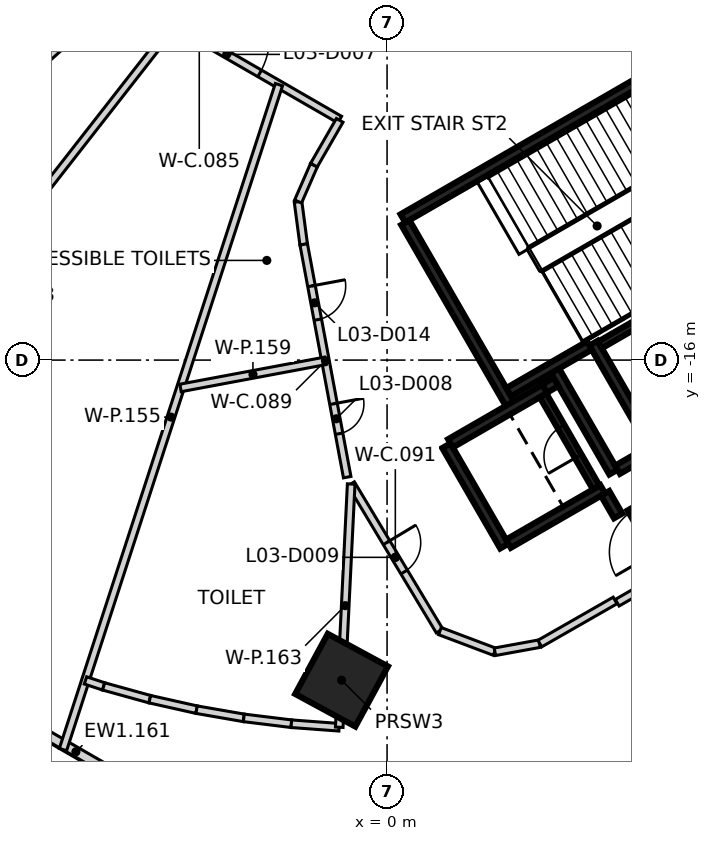
"""IFC4 building model, lengths in metres.
Left out: names, types, materials, properties, quantities, classifications, styles, units other than length and angle.
Written with IfcOpenShell. Run it as: python <this file> out.ifc"""

import sys

from ifc_helpers import new_model, si_unit, direction, frame, frame_2d, origin, origin_2d, place, context, subcontext, project, spatial, rectangle, extrude, element, fill, save


model = new_model("IFC4")
c1 = context("Model", 3, precision=1e-05, world=origin(), true_north=direction((0.0, 1.0)))
c2 = subcontext(c1, "Body", "Model", "MODEL_VIEW")
j1 = project(units=[si_unit("LENGTHUNIT", "METRE"), si_unit("PLANEANGLEUNIT", "RADIAN")], contexts=[c1])
p1 = place(None, origin())
s1 = spatial("IfcSite", under=j1, at=p1, CompositionType="ELEMENT")
p2 = place(p1, origin())
s2 = spatial("IfcBuilding", under=s1, at=p2, CompositionType="ELEMENT")
p3 = place(p2, frame((0.0, 0.0, 19.5)))
s3 = spatial("IfcBuildingStorey", under=s2, at=p3, CompositionType="ELEMENT", Elevation=19.5)
p4 = place(p3, frame((-1.197, -24.423, -0.35), z_axis=(0.0, 0.0, 1.0), x_axis=(0.476198301069, 0.879337920289, 0.0)))
e1 = element("IfcColumn", 1, at=p4, inside=s3, PredefinedType="COLUMN", context=c2, shape_type="SweptSolid", body=[
    extrude(rectangle(XDim=1.8, YDim=1.8, at=origin_2d()), origin(), (0.0, 0.0, 1.0), 2.5),
])
p5 = place(p3, frame((-6.21, -27.447, 0.0), z_axis=(0.0, 0.0, 1.0), x_axis=(-0.866046694585, 0.499963121439, 0.0)))
e2 = element("IfcWall", 2, at=p5, inside=s3, PredefinedType="SOLIDWALL", context=c2, shape_type="SweptSolid", body=[
    extrude(rectangle(XDim=4.566, YDim=0.25, at=frame_2d((2.283, 0.0))), origin(), (0.0, 0.0, 1.0), 4.55),
])
p6 = place(p3, frame((0.417, -12.273, 0.0), z_axis=(0.0, 0.0, 1.0), x_axis=(0.866021906294, 0.500006057782, 0.0)))
e3 = element("IfcWall", 3, at=p6, inside=s3, PredefinedType="SHEAR", context=c2, shape_type="SweptSolid", body=[
    extrude(rectangle(XDim=11.55, YDim=0.25, at=frame_2d((5.775, 0.0))), origin(), (0.0, 0.0, 1.0), 4.55),
])
p7 = place(p6, frame((10.025, 0.0, 0.0)))
e4 = element("IfcOpeningElement", 4, at=p7, cuts=e3, PredefinedType="OPENING", context=c2, shape_type="SweptSolid", body=[
    extrude(rectangle(XDim=1.2, YDim=2.1, at=frame_2d((0.6, 1.05))), frame((0.0, 0.135, 0.0), z_axis=(0.0, -1.0, 0.0), x_axis=(1.0, 0.0, 0.0)), (0.0, 0.0, 1.0), 0.27),
])
p8 = place(p6, frame((8.725, 0.0, 0.0)))
e5 = element("IfcOpeningElement", 5, at=p8, cuts=e3, PredefinedType="OPENING", context=c2, shape_type="SweptSolid", body=[
    extrude(rectangle(XDim=1.2, YDim=2.1, at=frame_2d((0.6, 1.05))), frame((0.0, 0.135, 0.0), z_axis=(0.0, -1.0, 0.0), x_axis=(1.0, 0.0, 0.0)), (0.0, 0.0, 1.0), 0.27),
])
p9 = place(p3, frame((3.235, -17.153, 0.0), z_axis=(0.0, 0.0, 1.0), x_axis=(-0.500008851346, 0.866020293397, 0.0)))
e6 = element("IfcWall", 6, at=p9, inside=s3, PredefinedType="SHEAR", context=c2, shape_type="SweptSolid", body=[
    extrude(rectangle(XDim=5.51, YDim=0.25, at=frame_2d((2.755, 0.0))), origin(), (0.0, 0.0, 1.0), 4.55),
])
p10 = place(p3, frame((7.031, -18.327, 0.0), z_axis=(0.0, 0.0, 1.0), x_axis=(-0.499971222258, 0.866042017984, 0.0)))
e7 = element("IfcWall", 7, at=p10, inside=s3, PredefinedType="SHEAR", context=c2, shape_type="SweptSolid", body=[
    extrude(rectangle(XDim=3.2, YDim=0.25, at=frame_2d((1.6, 0.0))), origin(), (0.0, 0.0, 1.0), 4.55),
])
p11 = place(p3, frame((3.085, -20.894, 0.0), z_axis=(0.0, 0.0, 1.0), x_axis=(-0.499978833458, 0.866037623948, 0.0)))
e8 = element("IfcWall", 8, at=p11, inside=s3, PredefinedType="SHEAR", context=c2, shape_type="SweptSolid", body=[
    extrude(rectangle(XDim=3.05, YDim=0.25, at=frame_2d((1.525, 0.0))), origin(), (0.0, 0.0, 1.0), 4.55),
])
p12 = place(p3, frame((1.669, -18.19, 0.0), z_axis=(0.0, 0.0, 1.0), x_axis=(0.866042235819, 0.499970844928, 0.0)))
e9 = element("IfcWall", 9, at=p12, inside=s3, PredefinedType="SHEAR", context=c2, shape_type="SweptSolid", body=[
    extrude(rectangle(XDim=2.865, YDim=0.25, at=frame_2d((1.432, 0.0))), origin(), (0.0, 0.0, 1.0), 4.55),
])
p13 = place(p3, frame((5.675, -19.399, 0.0), z_axis=(0.0, 0.0, 1.0), x_axis=(-0.866026637627, -0.499997862916, 0.0)))
e10 = element("IfcWall", 10, at=p13, inside=s3, PredefinedType="SHEAR", context=c2, shape_type="SweptSolid", body=[
    extrude(rectangle(XDim=2.865, YDim=0.25, at=frame_2d((1.432, 0.0))), origin(), (0.0, 0.0, 1.0), 4.55),
])
p14 = place(p3, frame((4.414, -16.276, 0.0), z_axis=(0.0, 0.0, 1.0), x_axis=(0.500003324108, -0.866023484601, 0.0)))
e11 = element("IfcWall", 11, at=p14, inside=s3, PredefinedType="SHEAR", context=c2, shape_type="SweptSolid", body=[
    extrude(rectangle(XDim=3.085, YDim=0.25, at=frame_2d((1.542, 0.0))), origin(), (0.0, 0.0, 1.0), 4.55),
])
p15 = place(p3, frame((5.322, -15.619, 0.0), z_axis=(0.0, 0.0, 1.0), x_axis=(-0.866026229868, -0.499998569178, 0.0)))
e12 = element("IfcWall", 12, at=p15, inside=s3, PredefinedType="SHEAR", context=c2, shape_type="SweptSolid", body=[
    extrude(rectangle(XDim=2.449, YDim=0.25, at=frame_2d((1.225, 0.0))), origin(), (0.0, 0.0, 1.0), 4.55),
])
p16 = place(p3, frame((7.367, -21.51, 0.0), z_axis=(0.0, 0.0, 1.0), x_axis=(-0.499983108224, 0.866035156036, 0.0)))
e13 = element("IfcWall", 13, at=p16, inside=s3, PredefinedType="SHEAR", context=c2, shape_type="SweptSolid", body=[
    extrude(rectangle(XDim=1.865, YDim=0.25, at=frame_2d((0.932, 0.0))), origin(), (0.0, 0.0, 1.0), 4.55),
])
p17 = place(p16, frame((0.535, 0.0, 0.0)))
e14 = element("IfcOpeningElement", 14, at=p17, cuts=e13, PredefinedType="OPENING", context=c2, shape_type="SweptSolid", body=[
    extrude(rectangle(XDim=1.25, YDim=2.1, at=frame_2d((0.625, 1.05))), frame((0.0, 0.135, 0.0), z_axis=(0.0, -1.0, 0.0), x_axis=(1.0, 0.0, 0.0)), (0.0, 0.0, 1.0), 0.27),
])
p18 = place(p3, frame((6.065, -18.885, 0.0), z_axis=(0.0, 0.0, 1.0), x_axis=(0.866017078145, 0.500014420154, 0.0)))
e15 = element("IfcWall", 15, at=p18, inside=s3, PredefinedType="SHEAR", context=c2, shape_type="SweptSolid", body=[
    extrude(rectangle(XDim=0.989, YDim=0.25, at=frame_2d((0.495, 0.0))), origin(), (0.0, 0.0, 1.0), 4.55),
])
p19 = place(p3, frame((6.08, -20.1, 0.0), z_axis=(0.0, 0.0, 1.0), x_axis=(-0.500051773299, 0.865995510393, 0.0)))
e16 = element("IfcWall", 16, at=p19, inside=s3, PredefinedType="SHEAR", context=c2, shape_type="SweptSolid", body=[
    extrude(rectangle(XDim=0.685, YDim=0.25, at=frame_2d((0.342, 0.0))), origin(), (0.0, 0.0, 1.0), 4.55),
])
p20 = place(p3, frame((4.145, -16.749, 0.0), z_axis=(0.0, 0.0, 1.0), x_axis=(0.866185586049, 0.49972245349, 0.0)))
e17 = element("IfcWall", 17, at=p20, inside=s3, PredefinedType="SHEAR", context=c2, shape_type="SweptSolid", body=[
    extrude(rectangle(XDim=0.344, YDim=0.25, at=frame_2d((0.172, 0.0))), origin(), (0.0, 0.0, 1.0), 4.55),
])
p21 = place(p3, frame((10.538, -12.752, 0.0), z_axis=(0.0, 0.0, 1.0), x_axis=(-0.866038630372, -0.499977090179, 0.0)))
e18 = element("IfcWall", 18, at=p21, inside=s3, PredefinedType="SHEAR", context=c2, shape_type="SweptSolid", body=[
    extrude(rectangle(XDim=5.699, YDim=0.2, at=frame_2d((2.85, 0.0))), origin(), (0.0, 0.0, 1.0), 4.55),
])
p22 = place(p3, frame((5.503, -19.352, 0.0), z_axis=(0.0, 0.0, 1.0), x_axis=(-0.499986818241, 0.866033014143, 0.0)))
e19 = element("IfcWall", 19, at=p22, inside=s3, PredefinedType="SHEAR", context=c2, shape_type="SweptSolid", body=[
    extrude(rectangle(XDim=2.798, YDim=0.2, at=frame_2d((1.399, 0.0))), origin(), (0.0, 0.0, 1.0), 4.55),
])
p23 = place(p22, frame((0.949, 0.0, 0.0)))
e20 = element("IfcOpeningElement", 20, at=p23, cuts=e19, PredefinedType="OPENING", context=c2, shape_type="SweptSolid", body=[
    extrude(rectangle(XDim=0.9, YDim=2.1, at=frame_2d((0.45, 1.05))), frame((0.0, 0.11, 0.0), z_axis=(0.0, -1.0, 0.0), x_axis=(1.0, 0.0, 0.0)), (0.0, 0.0, 1.0), 0.22),
])
p24 = place(p3, frame((-8.636, -5.407, 0.0), z_axis=(0.0, 0.0, 1.0), x_axis=(0.86608314541, -0.499899975231, 0.0)))
e21 = element("IfcWall", 21, at=p24, inside=s3, PredefinedType="PARTITIONING", context=c2, shape_type="SweptSolid", body=[
    extrude(rectangle(XDim=8.532, YDim=0.2, at=frame_2d((4.266, 0.0))), origin(), (0.0, 0.0, 1.0), 4.55),
])
p25 = place(p24, frame((2.231, 0.0, 0.0)))
e22 = element("IfcOpeningElement", 22, at=p25, cuts=e21, PredefinedType="OPENING", context=c2, shape_type="SweptSolid", body=[
    extrude(rectangle(XDim=0.9, YDim=2.1, at=frame_2d((0.45, 1.05))), frame((0.0, 0.11, 0.0), z_axis=(0.0, -1.0, 0.0), x_axis=(1.0, 0.0, 0.0)), (0.0, 0.0, 1.0), 0.22),
])
p26 = place(p24, frame((4.101, 0.0, 0.0)))
e23 = element("IfcOpeningElement", 23, at=p26, cuts=e21, PredefinedType="OPENING", context=c2, shape_type="SweptSolid", body=[
    extrude(rectangle(XDim=2.0, YDim=2.1, at=frame_2d((1.0, 1.05))), frame((0.0, 0.11, 0.0), z_axis=(0.0, -1.0, 0.0), x_axis=(1.0, 0.0, 0.0)), (0.0, 0.0, 1.0), 0.22),
])
p27 = place(p3, frame((-2.342, -11.835, 0.0), z_axis=(0.0, 0.0, 1.0), x_axis=(0.130834272089, -0.991404253192, 0.0)))
e24 = element("IfcWall", 24, at=p27, inside=s3, PredefinedType="PARTITIONING", context=c2, shape_type="SweptSolid", body=[
    extrude(rectangle(XDim=1.131, YDim=0.2, at=frame_2d((0.565, 0.0))), origin(), (0.0, 0.0, 1.0), 4.55),
])
p28 = place(p3, frame((-2.341, -11.827, 0.0), z_axis=(0.0, 0.0, 1.0), x_axis=(0.400116595296, 0.916464243803, 0.0)))
e25 = element("IfcWall", 25, at=p28, inside=s3, PredefinedType="PARTITIONING", context=c2, shape_type="SweptSolid", body=[
    extrude(rectangle(XDim=1.04, YDim=0.2, at=frame_2d((0.52, 0.0))), origin(), (0.0, 0.0, 1.0), 4.55),
])
p29 = place(p3, frame((-2.193, -12.956, 0.0), z_axis=(0.0, 0.0, 1.0), x_axis=(0.183666249042, -0.982988661665, 0.0)))
e26 = element("IfcWall", 26, at=p29, inside=s3, PredefinedType="PARTITIONING", context=c2, shape_type="SweptSolid", body=[
    extrude(rectangle(XDim=6.23, YDim=0.2, at=frame_2d((3.115, 0.0))), origin(), (0.0, 0.0, 1.0), 4.55),
])
p30 = place(p29, frame((4.268, 0.0, 0.0)))
e27 = element("IfcOpeningElement", 27, at=p30, cuts=e26, PredefinedType="OPENING", context=c2, shape_type="SweptSolid", body=[
    extrude(rectangle(XDim=0.8, YDim=2.1, at=frame_2d((0.4, 1.05))), frame((0.0, 0.11, 0.0), z_axis=(0.0, -1.0, 0.0), x_axis=(1.0, 0.0, 0.0)), (0.0, 0.0, 1.0), 0.22),
])
p31 = place(p29, frame((1.114, 0.0, 0.0)))
e28 = element("IfcOpeningElement", 28, at=p31, cuts=e26, PredefinedType="OPENING", context=c2, shape_type="SweptSolid", body=[
    extrude(rectangle(XDim=0.9, YDim=2.1, at=frame_2d((0.45, 1.05))), frame((0.0, 0.11, 0.0), z_axis=(0.0, -1.0, 0.0), x_axis=(1.0, 0.0, 0.0)), (0.0, 0.0, 1.0), 0.22),
])
p32 = place(p3, frame((-1.924, -10.869, 0.0), z_axis=(0.0, 0.0, 1.0), x_axis=(0.499136241111, 0.866523521209, 0.0)))
e29 = element("IfcWall", 29, at=p32, inside=s3, PredefinedType="PARTITIONING", context=c2, shape_type="SweptSolid", body=[
    extrude(rectangle(XDim=1.358, YDim=0.2, at=frame_2d((0.679, 0.0))), origin(), (0.0, 0.0, 1.0), 4.55),
])
p33 = place(p3, frame((-0.946, -19.254, 0.0), z_axis=(0.0, 0.0, 1.0), x_axis=(0.515131406019, -0.857111214798, 0.0)))
e30 = element("IfcWall", 30, at=p33, inside=s3, PredefinedType="PARTITIONING", context=c2, shape_type="SweptSolid", body=[
    extrude(rectangle(XDim=4.518, YDim=0.2, at=frame_2d((2.259, 0.0))), origin(), (0.0, 0.0, 1.0), 4.55),
])
p34 = place(p33, frame((1.809, 0.0, 0.0)))
e31 = element("IfcOpeningElement", 31, at=p34, cuts=e30, PredefinedType="OPENING", context=c2, shape_type="SweptSolid", body=[
    extrude(rectangle(XDim=0.9, YDim=2.1, at=frame_2d((0.45, 1.05))), frame((0.0, 0.11, 0.0), z_axis=(0.0, -1.0, 0.0), x_axis=(1.0, 0.0, 0.0)), (0.0, 0.0, 1.0), 0.22),
])
p35 = place(p3, frame((1.39, -23.131, 0.0), z_axis=(0.0, 0.0, 1.0), x_axis=(0.935656991295, -0.352910745997, 0.0)))
e32 = element("IfcWall", 32, at=p35, inside=s3, PredefinedType="PARTITIONING", context=c2, shape_type="SweptSolid", body=[
    extrude(rectangle(XDim=1.541, YDim=0.2, at=frame_2d((0.771, 0.0))), origin(), (0.0, 0.0, 1.0), 4.55),
])
p36 = place(p3, frame((2.837, -23.675, 0.0), z_axis=(0.0, 0.0, 1.0), x_axis=(0.983774851332, 0.179407474447, 0.0)))
e33 = element("IfcWall", 33, at=p36, inside=s3, PredefinedType="PARTITIONING", context=c2, shape_type="SweptSolid", body=[
    extrude(rectangle(XDim=1.193, YDim=0.2, at=frame_2d((0.597, 0.0))), origin(), (0.0, 0.0, 1.0), 4.55),
])
p37 = place(p3, frame((4.019, -23.459, 0.0), z_axis=(0.0, 0.0, 1.0), x_axis=(0.86785453754, 0.496818378959, 0.0)))
e34 = element("IfcWall", 34, at=p37, inside=s3, PredefinedType="PARTITIONING", context=c2, shape_type="SweptSolid", body=[
    extrude(rectangle(XDim=2.282, YDim=0.2, at=frame_2d((1.141, 0.0))), origin(), (0.0, 0.0, 1.0), 4.55),
])
p38 = place(p3, frame((6.056, -22.384, 0.0), z_axis=(0.0, 0.0, 1.0), x_axis=(0.866396419095, 0.499356831314, 0.0)))
e35 = element("IfcWall", 35, at=p38, inside=s3, PredefinedType="PARTITIONING", context=c2, shape_type="SweptSolid", body=[
    extrude(rectangle(XDim=1.387, YDim=0.2, at=frame_2d((0.694, 0.0))), origin(), (0.0, 0.0, 1.0), 4.55),
])
p39 = place(p3, frame((-21.094, -18.993, 0.0), z_axis=(0.0, 0.0, 1.0), x_axis=(0.743122161884, 0.669155775972, 0.0)))
e36 = element("IfcWall", 36, at=p39, inside=s3, PredefinedType="PARTITIONING", context=c2, shape_type="SweptSolid", body=[
    extrude(rectangle(XDim=18.92, YDim=0.2, at=frame_2d((9.46, 0.0))), origin(), (0.0, 0.0, 1.0), 2.15),
])
p40 = place(p3, frame((-16.783, -21.481, 0.0), z_axis=(0.0, 0.0, 1.0), x_axis=(0.615637784037, 0.788029262696, 0.0)))
e37 = element("IfcWall", 37, at=p40, inside=s3, PredefinedType="PARTITIONING", context=c2, shape_type="SweptSolid", body=[
    extrude(rectangle(XDim=18.17, YDim=0.2, at=frame_2d((9.085, 0.0))), origin(), (0.0, 0.0, 1.0), 2.15),
])
p41 = place(p3, frame((-8.528, -26.248, 0.0), z_axis=(0.0, 0.0, 1.0), x_axis=(0.308912004648, 0.951090623119, 0.0)))
e38 = element("IfcWall", 38, at=p41, inside=s3, PredefinedType="PARTITIONING", context=c2, shape_type="SweptSolid", body=[
    extrude(rectangle(XDim=18.395, YDim=0.2, at=frame_2d((9.197, 0.0))), origin(), (0.0, 0.0, 1.0), 2.15),
])
p42 = place(p3, frame((-7.935, -24.428, 0.0), z_axis=(0.0, 0.0, 1.0), x_axis=(0.949312985708, -0.314332395984, 0.0)))
e39 = element("IfcWall", 39, at=p42, inside=s3, PredefinedType="PARTITIONING", context=c2, shape_type="SweptSolid", body=[
    extrude(rectangle(XDim=0.502, YDim=0.2, at=frame_2d((0.251, 0.0))), origin(), (0.0, 0.0, 1.0), 4.55),
])
p43 = place(p3, frame((-7.458, -24.586, 0.0), z_axis=(0.0, 0.0, 1.0), x_axis=(0.96379206232, -0.266654946718, 0.0)))
e40 = element("IfcWall", 40, at=p43, inside=s3, PredefinedType="PARTITIONING", context=c2, shape_type="SweptSolid", body=[
    extrude(rectangle(XDim=1.261, YDim=0.2, at=frame_2d((0.63, 0.0))), origin(), (0.0, 0.0, 1.0), 4.55),
])
p44 = place(p3, frame((-6.243, -24.922, 0.0), z_axis=(0.0, 0.0, 1.0), x_axis=(0.975793849567, -0.218692393893, 0.0)))
e41 = element("IfcWall", 41, at=p44, inside=s3, PredefinedType="PARTITIONING", context=c2, shape_type="SweptSolid", body=[
    extrude(rectangle(XDim=1.261, YDim=0.2, at=frame_2d((0.631, 0.0))), origin(), (0.0, 0.0, 1.0), 4.55),
])
p45 = place(p3, frame((-5.435, -16.733, 0.0), z_axis=(0.0, 0.0, 1.0), x_axis=(0.982959024913, 0.183824795232, 0.0)))
e42 = element("IfcWall", 42, at=p45, inside=s3, PredefinedType="PARTITIONING", context=c2, shape_type="SweptSolid", body=[
    extrude(rectangle(XDim=3.878, YDim=0.2, at=frame_2d((1.939, 0.0))), origin(), (0.0, 0.0, 1.0), 4.55),
])
p46 = place(p3, frame((-5.012, -25.198, 0.0), z_axis=(0.0, 0.0, 1.0), x_axis=(0.985201803115, -0.171398387214, 0.0)))
e43 = element("IfcWall", 43, at=p46, inside=s3, PredefinedType="PARTITIONING", context=c2, shape_type="SweptSolid", body=[
    extrude(rectangle(XDim=1.26, YDim=0.2, at=frame_2d((0.63, 0.0))), origin(), (0.0, 0.0, 1.0), 4.55),
])
p47 = place(p3, frame((-3.77, -25.414, 0.0), z_axis=(0.0, 0.0, 1.0), x_axis=(0.992514259678, -0.122128802234, 0.0)))
e44 = element("IfcWall", 44, at=p47, inside=s3, PredefinedType="PARTITIONING", context=c2, shape_type="SweptSolid", body=[
    extrude(rectangle(XDim=1.261, YDim=0.2, at=frame_2d((0.631, 0.0))), origin(), (0.0, 0.0, 1.0), 4.55),
])
p48 = place(p3, frame((-2.518, -25.568, 0.0), z_axis=(0.0, 0.0, 1.0), x_axis=(0.997287799619, -0.073600575618, 0.0)))
e45 = element("IfcWall", 45, at=p48, inside=s3, PredefinedType="PARTITIONING", context=c2, shape_type="SweptSolid", body=[
    extrude(rectangle(XDim=1.26, YDim=0.2, at=frame_2d((0.63, 0.0))), origin(), (0.0, 0.0, 1.0), 4.55),
])
p49 = place(p3, frame((-1.258, -25.661, 0.0), z_axis=(0.0, 0.0, 1.0), x_axis=(0.048998828987, 0.998798835981, 0.0)))
e46 = element("IfcWall", 46, at=p49, inside=s3, PredefinedType="PARTITIONING", context=c2, shape_type="SweptSolid", body=[
    extrude(rectangle(XDim=6.408, YDim=0.2, at=frame_2d((3.204, 0.0))), origin(), (0.0, 0.0, 1.0), 2.15),
])
p50 = place(p23, origin())
e47 = element("IfcDoor", 47, at=p50, inside=s3, OperationType="SINGLE_SWING_RIGHT", PredefinedType="DOOR", context=c2, shape_type="SweptSolid", body=[
    extrude(rectangle(XDim=0.9, YDim=2.1, at=frame_2d((0.45, 1.05))), frame((0.0, 0.025, 0.0), z_axis=(0.0, -1.0, 0.0), x_axis=(1.0, 0.0, 0.0)), (0.0, 0.0, 1.0), 0.05),
])
fill(e20, e47)
p51 = place(p26, frame((2.0, 0.0, 0.0), z_axis=(0.0, 0.0, 1.0), x_axis=(-1.0, 0.0, 0.0)))
e48 = element("IfcDoor", 48, at=p51, inside=s3, OperationType="DOUBLE_DOOR_SINGLE_SWING", PredefinedType="DOOR", context=c2, shape_type="SweptSolid", body=[
    extrude(rectangle(XDim=2.0, YDim=2.1, at=frame_2d((1.0, 1.05))), frame((0.0, 0.025, 0.0), z_axis=(0.0, -1.0, 0.0), x_axis=(1.0, 0.0, 0.0)), (0.0, 0.0, 1.0), 0.05),
])
fill(e23, e48)
p52 = place(p30, frame((0.8, 0.0, 0.0), z_axis=(0.0, 0.0, 1.0), x_axis=(-1.0, 0.0, 0.0)))
e49 = element("IfcDoor", 49, at=p52, inside=s3, OperationType="SINGLE_SWING_LEFT", PredefinedType="DOOR", context=c2, shape_type="SweptSolid", body=[
    extrude(rectangle(XDim=0.8, YDim=2.1, at=frame_2d((0.4, 1.05))), frame((0.0, 0.025, 0.0), z_axis=(0.0, -1.0, 0.0), x_axis=(1.0, 0.0, 0.0)), (0.0, 0.0, 1.0), 0.05),
])
fill(e27, e49)
p53 = place(p34, origin())
e50 = element("IfcDoor", 50, at=p53, inside=s3, OperationType="SINGLE_SWING_LEFT", PredefinedType="DOOR", context=c2, shape_type="SweptSolid", body=[
    extrude(rectangle(XDim=0.9, YDim=2.1, at=frame_2d((0.45, 1.05))), frame((0.0, 0.025, 0.0), z_axis=(0.0, -1.0, 0.0), x_axis=(1.0, 0.0, 0.0)), (0.0, 0.0, 1.0), 0.05),
])
fill(e31, e50)
p54 = place(p31, frame((0.9, 0.0, 0.0), z_axis=(0.0, 0.0, 1.0), x_axis=(-1.0, 0.0, 0.0)))
e51 = element("IfcDoor", 51, at=p54, inside=s3, OperationType="SINGLE_SWING_LEFT", PredefinedType="DOOR", context=c2, shape_type="SweptSolid", body=[
    extrude(rectangle(XDim=0.9, YDim=2.1, at=frame_2d((0.45, 1.05))), frame((0.0, 0.025, 0.0), z_axis=(0.0, -1.0, 0.0), x_axis=(1.0, 0.0, 0.0)), (0.0, 0.0, 1.0), 0.05),
])
fill(e28, e51)
save(model, sys.argv[1])
